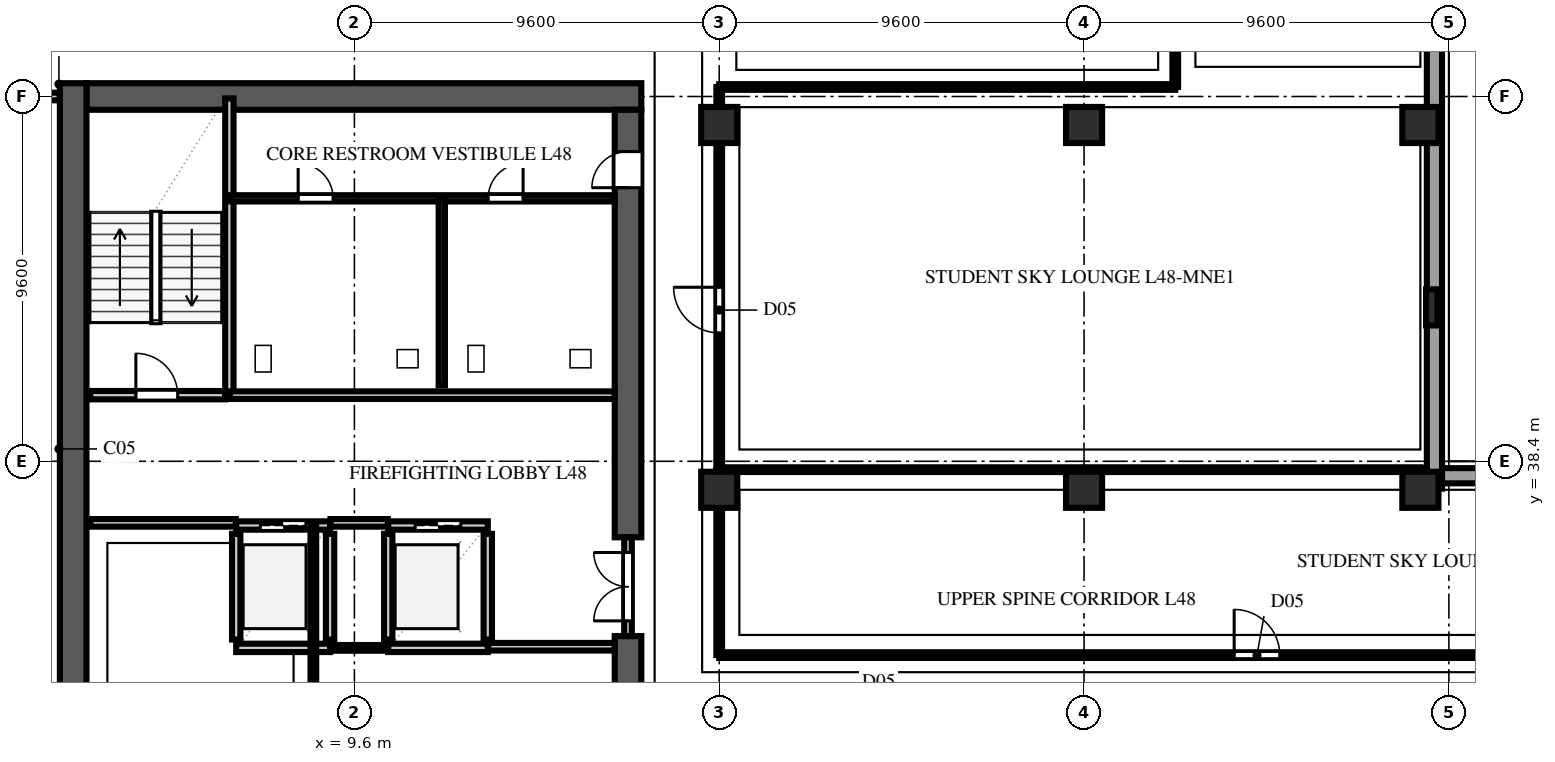
"""IFC4 building model, lengths in metres.
Left out: names, types, materials, properties, quantities, classifications, styles, units other than length and angle.
Written with IfcOpenShell. Run it as: python <this file> out.ifc"""

import sys

from ifc_helpers import new_model, si_unit, direction, frame, frame_2d, origin, origin_2d, place, context, subcontext, project, spatial, rectangle, extrude, element, fill, save


model = new_model("IFC4")
c1 = context("Model", 3, precision=1e-05, world=origin(), true_north=direction((0.0, 1.0)))
c2 = subcontext(c1, "Body", "Model", "MODEL_VIEW")
j1 = project(units=[si_unit("LENGTHUNIT", "METRE"), si_unit("PLANEANGLEUNIT", "RADIAN")], contexts=[c1])
p1 = place(None, origin())
s1 = spatial("IfcSite", under=j1, at=p1, CompositionType="ELEMENT")
p2 = place(p1, origin())
s2 = spatial("IfcBuilding", under=s1, at=p2, CompositionType="ELEMENT")
p3 = place(p2, frame((0.0, 0.0, 190.2)))
s3 = spatial("IfcBuildingStorey", under=s2, at=p3, CompositionType="ELEMENT", Elevation=190.2)
p4 = place(p3, frame((2.55, 48.0, 0.0), z_axis=(0.0, 0.0, 1.0), x_axis=(1.0, 0.0, 0.0)))
e1 = element("IfcWall", 1, at=p4, inside=s3, PredefinedType="SHEAR", context=c2, shape_type="SweptSolid", body=[
    extrude(rectangle(XDim=14.6, YDim=0.7, at=frame_2d((7.3, 0.0))), origin(), (0.0, 0.0, 1.0), 3.48),
])
p5 = place(p3, frame((2.2, 9.25, 0.0), z_axis=(0.0, 0.0, 1.0), x_axis=(0.0, 1.0, 0.0)))
e2 = element("IfcWall", 2, at=p5, inside=s3, PredefinedType="SHEAR", context=c2, shape_type="SweptSolid", body=[
    extrude(rectangle(XDim=39.1, YDim=0.7, at=frame_2d((19.55, 0.0))), origin(), (0.0, 0.0, 1.0), 3.48),
])
p6 = place(p3, frame((16.8, 26.0, 0.0), z_axis=(0.0, 0.0, 1.0), x_axis=(0.0, 1.0, 0.0)))
e3 = element("IfcWall", 3, at=p6, inside=s3, PredefinedType="SHEAR", context=c2, shape_type="SweptSolid", body=[
    extrude(rectangle(XDim=7.8, YDim=0.7, at=frame_2d((3.9, 0.0))), origin(), (0.0, 0.0, 1.0), 3.48),
])
p7 = place(p3, frame((16.8, 36.4, 0.0), z_axis=(0.0, 0.0, 1.0), x_axis=(0.0, 1.0, 0.0)))
e4 = element("IfcWall", 4, at=p7, inside=s3, PredefinedType="SHEAR", context=c2, shape_type="SweptSolid", body=[
    extrude(rectangle(XDim=11.25, YDim=0.7, at=frame_2d((5.625, 0.0))), origin(), (0.0, 0.0, 1.0), 3.48),
])
p8 = place(p7, frame((9.2, 0.0, 0.0)))
e5 = element("IfcOpeningElement", 5, at=p8, cuts=e4, PredefinedType="OPENING", context=c2, shape_type="SweptSolid", body=[
    extrude(rectangle(XDim=0.95, YDim=2.15, at=frame_2d((0.475, 1.075))), frame((0.0, 0.362, 0.0), z_axis=(0.0, -1.0, 0.0), x_axis=(1.0, 0.0, 0.0)), (0.0, 0.0, 1.0), 0.724),
])
for number, where, z_axis, x_axis in (
    (6, (19.2, 37.65, 0.0), (0.0, 0.0, 1.0), (1.0, 0.0, 0.0)),
    (7, (19.2, 47.25, 0.0), (0.0, 0.0, 1.0), (1.0, 0.0, 0.0)),
    (8, (28.8, 37.65, 0.0), (0.0, 0.0, 1.0), (1.0, 0.0, 0.0)),
    (9, (28.8, 47.25, 0.0), (0.0, 0.0, 1.0), (1.0, 0.0, 0.0)),
    (10, (37.65, 37.65, 0.0), (0.0, 0.0, 1.0), (1.0, 0.0, 0.0)),
    (11, (37.65, 47.25, 0.0), (0.0, 0.0, 1.0), (1.0, 0.0, 0.0)),
):
    element("IfcColumn", number, at=place(p3, frame(where, z_axis=z_axis, x_axis=x_axis)), inside=s3, PredefinedType="COLUMN", context=c2, shape_type="SweptSolid", body=[
        extrude(rectangle(XDim=0.95, YDim=0.95, at=origin_2d()), origin(), (0.0, 0.0, 1.0), 3.8),
    ])
p9 = place(p3, frame((37.95, 42.45, 0.0), z_axis=(0.0, 0.0, 1.0), x_axis=(0.0, 1.0, 0.0)))
e12 = element("IfcColumn", 12, at=p9, inside=s3, PredefinedType="PILASTER", context=c2, shape_type="SweptSolid", body=[
    extrude(rectangle(XDim=0.95, YDim=0.3, at=origin_2d()), origin(), (0.0, 0.0, 1.0), 3.8),
])
p10 = place(p3, frame((55.76, 38.02, 0.0), z_axis=(0.0, 0.0, 1.0), x_axis=(-1.0, 0.0, 0.0)))
e13 = element("IfcWall", 13, at=p10, inside=s3, PredefinedType="SOLIDWALL", context=c2, shape_type="SweptSolid", body=[
    extrude(rectangle(XDim=18.08, YDim=0.4, at=frame_2d((9.04, 0.0))), origin(), (0.0, 0.0, 1.0), 3.48),
])
p11 = place(p3, frame((38.02, 37.68, 0.0), z_axis=(0.0, 0.0, 1.0), x_axis=(0.0, 1.0, 0.0)))
e14 = element("IfcWall", 14, at=p11, inside=s3, PredefinedType="SOLIDWALL", context=c2, shape_type="SweptSolid", body=[
    extrude(rectangle(XDim=27.68, YDim=0.4, at=frame_2d((13.84, 0.0))), origin(), (0.0, 0.0, 1.0), 3.48),
])
p12 = place(p3, frame((2.65, 40.14, 0.0), z_axis=(0.0, 0.0, 1.0), x_axis=(1.0, 0.0, 0.0)))
e15 = element("IfcWall", 15, at=p12, inside=s3, PredefinedType="SOLIDWALL", context=c2, shape_type="SweptSolid", body=[
    extrude(rectangle(XDim=3.55, YDim=0.22, at=frame_2d((1.775, 0.0))), origin(), (0.0, 0.0, 1.0), 3.48),
])
p13 = place(p12, frame((1.2, 0.0, 0.0)))
e16 = element("IfcOpeningElement", 16, at=p13, cuts=e15, PredefinedType="OPENING", context=c2, shape_type="SweptSolid", body=[
    extrude(rectangle(XDim=1.1, YDim=2.2, at=frame_2d((0.55, 1.1))), frame((0.0, 0.122, 0.0), z_axis=(0.0, -1.0, 0.0), x_axis=(1.0, 0.0, 0.0)), (0.0, 0.0, 1.0), 0.244),
])
p14 = place(p3, frame((6.31, 40.14, 0.0), z_axis=(0.0, 0.0, 1.0), x_axis=(0.0, 1.0, 0.0)))
e17 = element("IfcWall", 17, at=p14, inside=s3, PredefinedType="SOLIDWALL", context=c2, shape_type="SweptSolid", body=[
    extrude(rectangle(XDim=7.81, YDim=0.22, at=frame_2d((3.905, 0.0))), origin(), (0.0, 0.0, 1.0), 3.48),
])
for number, where, z_axis, x_axis in (
    (18, (6.49, 33.71, 0.0), (0.0, 0.0, 1.0), (0.0, 1.0, 0.0)),
    (19, (8.96, 33.71, 0.0), (0.0, 0.0, 1.0), (0.0, 1.0, 0.0)),
):
    element("IfcWall", number, at=place(p3, frame(where, z_axis=z_axis, x_axis=x_axis)), inside=s3, PredefinedType="SOLIDWALL", context=c2, shape_type="SweptSolid", body=[
        extrude(rectangle(XDim=2.78, YDim=0.22, at=frame_2d((1.39, 0.0))), origin(), (0.0, 0.0, 1.0), 3.48),
    ])
p15 = place(p3, frame((6.49, 33.49, 0.0), z_axis=(0.0, 0.0, 1.0), x_axis=(1.0, 0.0, 0.0)))
e20 = element("IfcWall", 20, at=p15, inside=s3, PredefinedType="SOLIDWALL", context=c2, shape_type="SweptSolid", body=[
    extrude(rectangle(XDim=2.47, YDim=0.22, at=frame_2d((1.235, 0.0))), origin(), (0.0, 0.0, 1.0), 3.48),
])
p16 = place(p3, frame((6.49, 36.71, 0.0), z_axis=(0.0, 0.0, 1.0), x_axis=(1.0, 0.0, 0.0)))
e21 = element("IfcWall", 21, at=p16, inside=s3, PredefinedType="SOLIDWALL", context=c2, shape_type="SweptSolid", body=[
    extrude(rectangle(XDim=2.47, YDim=0.22, at=frame_2d((1.235, 0.0))), origin(), (0.0, 0.0, 1.0), 3.48),
])
p17 = place(p16, frame((0.635, 0.0, 0.0)))
e22 = element("IfcOpeningElement", 22, at=p17, cuts=e21, PredefinedType="OPENING", context=c2, shape_type="SweptSolid", body=[
    extrude(rectangle(XDim=1.2, YDim=2.2, at=frame_2d((0.6, 1.1))), frame((0.0, 0.122, 0.0), z_axis=(0.0, -1.0, 0.0), x_axis=(1.0, 0.0, 0.0)), (0.0, 0.0, 1.0), 0.244),
])
for number, where, z_axis, x_axis in (
    (23, (10.49, 33.71, 0.0), (0.0, 0.0, 1.0), (0.0, 1.0, 0.0)),
    (24, (13.11, 33.71, 0.0), (0.0, 0.0, 1.0), (0.0, 1.0, 0.0)),
):
    element("IfcWall", number, at=place(p3, frame(where, z_axis=z_axis, x_axis=x_axis)), inside=s3, PredefinedType="SOLIDWALL", context=c2, shape_type="SweptSolid", body=[
        extrude(rectangle(XDim=2.78, YDim=0.22, at=frame_2d((1.39, 0.0))), origin(), (0.0, 0.0, 1.0), 3.48),
    ])
p18 = place(p3, frame((10.49, 33.49, 0.0), z_axis=(0.0, 0.0, 1.0), x_axis=(1.0, 0.0, 0.0)))
e25 = element("IfcWall", 25, at=p18, inside=s3, PredefinedType="SOLIDWALL", context=c2, shape_type="SweptSolid", body=[
    extrude(rectangle(XDim=2.62, YDim=0.22, at=frame_2d((1.31, 0.0))), origin(), (0.0, 0.0, 1.0), 3.48),
])
p19 = place(p3, frame((10.49, 36.71, 0.0), z_axis=(0.0, 0.0, 1.0), x_axis=(1.0, 0.0, 0.0)))
e26 = element("IfcWall", 26, at=p19, inside=s3, PredefinedType="SOLIDWALL", context=c2, shape_type="SweptSolid", body=[
    extrude(rectangle(XDim=2.62, YDim=0.22, at=frame_2d((1.31, 0.0))), origin(), (0.0, 0.0, 1.0), 3.48),
])
p20 = place(p19, frame((0.71, 0.0, 0.0)))
e27 = element("IfcOpeningElement", 27, at=p20, cuts=e26, PredefinedType="OPENING", context=c2, shape_type="SweptSolid", body=[
    extrude(rectangle(XDim=1.2, YDim=2.2, at=frame_2d((0.6, 1.1))), frame((0.0, 0.122, 0.0), z_axis=(0.0, -1.0, 0.0), x_axis=(1.0, 0.0, 0.0)), (0.0, 0.0, 1.0), 0.244),
])
p21 = place(p3, frame((2.65, 36.78, 0.0), z_axis=(0.0, 0.0, 1.0), x_axis=(1.0, 0.0, 0.0)))
e28 = element("IfcWall", 28, at=p21, inside=s3, PredefinedType="SOLIDWALL", context=c2, shape_type="SweptSolid", body=[
    extrude(rectangle(XDim=3.83, YDim=0.2, at=frame_2d((1.915, 0.0))), origin(), (0.0, 0.0, 1.0), 3.48),
])
p22 = place(p3, frame((8.97, 36.78, 0.0), z_axis=(0.0, 0.0, 1.0), x_axis=(1.0, 0.0, 0.0)))
e29 = element("IfcWall", 29, at=p22, inside=s3, PredefinedType="SOLIDWALL", context=c2, shape_type="SweptSolid", body=[
    extrude(rectangle(XDim=1.51, YDim=0.2, at=frame_2d((0.755, 0.0))), origin(), (0.0, 0.0, 1.0), 3.48),
])
p23 = place(p3, frame((13.12, 33.52, 0.0), z_axis=(0.0, 0.0, 1.0), x_axis=(1.0, 0.0, 0.0)))
e30 = element("IfcWall", 30, at=p23, inside=s3, PredefinedType="SOLIDWALL", context=c2, shape_type="SweptSolid", body=[
    extrude(rectangle(XDim=3.33, YDim=0.2, at=frame_2d((1.665, 0.0))), origin(), (0.0, 0.0, 1.0), 3.48),
])
p24 = place(p3, frame((6.32, 40.14, 0.0), z_axis=(0.0, 0.0, 1.0), x_axis=(1.0, 0.0, 0.0)))
e31 = element("IfcWall", 31, at=p24, inside=s3, PredefinedType="SOLIDWALL", context=c2, shape_type="SweptSolid", body=[
    extrude(rectangle(XDim=10.13, YDim=0.2, at=frame_2d((5.065, 0.0))), origin(), (0.0, 0.0, 1.0), 3.48),
])
p25 = place(p3, frame((16.8, 33.8, 0.0), z_axis=(0.0, 0.0, 1.0), x_axis=(0.0, 1.0, 0.0)))
e32 = element("IfcWall", 32, at=p25, inside=s3, PredefinedType="SOLIDWALL", context=c2, shape_type="SweptSolid", body=[
    extrude(rectangle(XDim=2.6, YDim=0.2, at=frame_2d((1.3, 0.0))), origin(), (0.0, 0.0, 1.0), 3.48),
])
p26 = place(p25, frame((0.4, 0.0, 0.0)))
e33 = element("IfcOpeningElement", 33, at=p26, cuts=e32, PredefinedType="OPENING", context=c2, shape_type="SweptSolid", body=[
    extrude(rectangle(XDim=1.8, YDim=2.2, at=frame_2d((0.9, 1.1))), frame((0.0, 0.112, 0.0), z_axis=(0.0, -1.0, 0.0), x_axis=(1.0, 0.0, 0.0)), (0.0, 0.0, 1.0), 0.224),
])
p27 = place(p3, frame((8.965, 33.49, 0.0), z_axis=(0.0, 0.0, 1.0), x_axis=(1.0, 0.0, 0.0)))
e34 = element("IfcWall", 34, at=p27, inside=s3, PredefinedType="PARTITIONING", context=c2, shape_type="SweptSolid", body=[
    extrude(rectangle(XDim=1.52, YDim=0.15, at=frame_2d((0.76, 0.0))), origin(), (0.0, 0.0, 1.0), 3.48),
])
p28 = place(p3, frame((8.52, 12.02, 0.0), z_axis=(0.0, 0.0, 1.0), x_axis=(0.0, 1.0, 0.0)))
e35 = element("IfcWall", 35, at=p28, inside=s3, PredefinedType="PARTITIONING", context=c2, shape_type="SweptSolid", body=[
    extrude(rectangle(XDim=24.76, YDim=0.15, at=frame_2d((12.38, 0.0))), origin(), (0.0, 0.0, 1.0), 3.48),
])
p29 = place(p28, frame((2.0, 0.0, 0.0)))
e36 = element("IfcOpeningElement", 36, at=p29, cuts=e35, PredefinedType="OPENING", context=c2, shape_type="SweptSolid", body=[
    extrude(rectangle(XDim=0.85, YDim=2.1, at=frame_2d((0.425, 1.05))), frame((0.0, 0.087, 0.0), z_axis=(0.0, -1.0, 0.0), x_axis=(1.0, 0.0, 0.0)), (0.0, 0.0, 1.0), 0.174),
])
p30 = place(p28, frame((12.0, 0.0, 0.0)))
e37 = element("IfcOpeningElement", 37, at=p30, cuts=e35, PredefinedType="OPENING", context=c2, shape_type="SweptSolid", body=[
    extrude(rectangle(XDim=1.0, YDim=2.2, at=frame_2d((0.5, 1.1))), frame((0.0, 0.087, 0.0), z_axis=(0.0, -1.0, 0.0), x_axis=(1.0, 0.0, 0.0)), (0.0, 0.0, 1.0), 0.174),
])
p31 = place(p3, frame((6.32, 45.32, 0.0), z_axis=(0.0, 0.0, 1.0), x_axis=(1.0, 0.0, 0.0)))
e38 = element("IfcWall", 38, at=p31, inside=s3, PredefinedType="PLUMBINGWALL", context=c2, shape_type="SweptSolid", body=[
    extrude(rectangle(XDim=10.13, YDim=0.165, at=frame_2d((5.065, 0.0))), origin(), (0.0, 0.0, 1.0), 3.48),
])
p32 = place(p31, frame((1.8, 0.0, 0.0)))
e39 = element("IfcOpeningElement", 39, at=p32, cuts=e38, PredefinedType="OPENING", context=c2, shape_type="SweptSolid", body=[
    extrude(rectangle(XDim=0.92, YDim=2.15, at=frame_2d((0.46, 1.075))), frame((0.0, 0.094, 0.0), z_axis=(0.0, -1.0, 0.0), x_axis=(1.0, 0.0, 0.0)), (0.0, 0.0, 1.0), 0.189),
])
p33 = place(p31, frame((6.8, 0.0, 0.0)))
e40 = element("IfcOpeningElement", 40, at=p33, cuts=e38, PredefinedType="OPENING", context=c2, shape_type="SweptSolid", body=[
    extrude(rectangle(XDim=0.92, YDim=2.15, at=frame_2d((0.46, 1.075))), frame((0.0, 0.094, 0.0), z_axis=(0.0, -1.0, 0.0), x_axis=(1.0, 0.0, 0.0)), (0.0, 0.0, 1.0), 0.189),
])
p34 = place(p3, frame((11.9, 40.4, 0.0), z_axis=(0.0, 0.0, 1.0), x_axis=(0.0, 1.0, 0.0)))
e41 = element("IfcWall", 41, at=p34, inside=s3, PredefinedType="PLUMBINGWALL", context=c2, shape_type="SweptSolid", body=[
    extrude(rectangle(XDim=4.92, YDim=0.165, at=frame_2d((2.46, 0.0))), origin(), (0.0, 0.0, 1.0), 3.48),
])
p35 = place(p3, frame((0.85, 48.0, 0.0), z_axis=(0.0, 0.0, 1.0), x_axis=(1.0, 0.0, 0.0)))
e42 = element("IfcWall", 42, at=p35, inside=s3, PredefinedType="SOLIDWALL", context=c2, shape_type="SweptSolid", body=[
    extrude(rectangle(XDim=0.995, YDim=0.2, at=frame_2d((0.498, 0.0))), origin(), (0.0, 0.0, 1.0), 3.48),
])
p36 = place(p3, frame((19.2, 33.3, 0.0), z_axis=(0.0, 0.0, 1.0), x_axis=(1.0, 0.0, 0.0)))
e43 = element("IfcWall", 43, at=p36, inside=s3, PredefinedType="PARTITIONING", context=c2, shape_type="SweptSolid", body=[
    extrude(rectangle(XDim=27.935, YDim=0.15, at=frame_2d((13.968, 0.0))), origin(), (0.0, 0.0, 1.0), 3.023),
])
p37 = place(p36, frame((13.55, 0.0, 0.0)))
e44 = element("IfcOpeningElement", 44, at=p37, cuts=e43, PredefinedType="OPENING", context=c2, shape_type="SweptSolid", body=[
    extrude(rectangle(XDim=1.2, YDim=2.2, at=frame_2d((0.6, 1.1))), frame((0.0, 0.087, 0.0), z_axis=(0.0, -1.0, 0.0), x_axis=(1.0, 0.0, 0.0)), (0.0, 0.0, 1.0), 0.174),
])
p38 = place(p3, frame((19.2, 33.3, 0.0), z_axis=(0.0, 0.0, 1.0), x_axis=(0.0, 1.0, 0.0)))
e45 = element("IfcWall", 45, at=p38, inside=s3, PredefinedType="PARTITIONING", context=c2, shape_type="SweptSolid", body=[
    extrude(rectangle(XDim=4.88, YDim=0.15, at=frame_2d((2.44, 0.0))), origin(), (0.0, 0.0, 1.0), 2.863),
])
p39 = place(p3, frame((19.28, 38.18, 0.0), z_axis=(0.0, 0.0, 1.0), x_axis=(1.0, 0.0, 0.0)))
e46 = element("IfcWall", 46, at=p39, inside=s3, PredefinedType="PARTITIONING", context=c2, shape_type="SweptSolid", body=[
    extrude(rectangle(XDim=18.37, YDim=0.125, at=frame_2d((9.185, 0.0))), origin(), (0.0, 0.0, 1.0), 3.48),
])
p40 = place(p3, frame((19.2, 38.18, 0.0), z_axis=(0.0, 0.0, 1.0), x_axis=(0.0, 1.0, 0.0)))
e47 = element("IfcWall", 47, at=p40, inside=s3, PredefinedType="PARTITIONING", context=c2, shape_type="SweptSolid", body=[
    extrude(rectangle(XDim=10.07, YDim=0.15, at=frame_2d((5.035, 0.0))), origin(), (0.0, 0.0, 1.0), 2.863),
])
p41 = place(p40, frame((3.6, 0.0, 0.0)))
e48 = element("IfcOpeningElement", 48, at=p41, cuts=e47, PredefinedType="OPENING", context=c2, shape_type="SweptSolid", body=[
    extrude(rectangle(XDim=1.2, YDim=2.2, at=frame_2d((0.6, 1.1))), frame((0.0, 0.087, 0.0), z_axis=(0.0, -1.0, 0.0), x_axis=(1.0, 0.0, 0.0)), (0.0, 0.0, 1.0), 0.174),
])
p42 = place(p3, frame((19.2, 48.25, 0.0), z_axis=(0.0, 0.0, 1.0), x_axis=(1.0, 0.0, 0.0)))
e49 = element("IfcWall", 49, at=p42, inside=s3, PredefinedType="PARTITIONING", context=c2, shape_type="SweptSolid", body=[
    extrude(rectangle(XDim=12.0, YDim=0.15, at=frame_2d((6.0, 0.0))), origin(), (0.0, 0.0, 1.0), 3.48),
])
p43 = place(p3, frame((31.2, 48.25, 0.0), z_axis=(0.0, 0.0, 1.0), x_axis=(0.0, 1.0, 0.0)))
e50 = element("IfcWall", 50, at=p43, inside=s3, PredefinedType="PARTITIONING", context=c2, shape_type="SweptSolid", body=[
    extrude(rectangle(XDim=18.73, YDim=0.15, at=frame_2d((9.365, 0.0))), origin(), (0.0, 0.0, 1.0), 3.48),
])
p44 = place(p43, frame((3.15, 0.0, 0.0)))
e51 = element("IfcOpeningElement", 51, at=p44, cuts=e50, PredefinedType="OPENING", context=c2, shape_type="SweptSolid", body=[
    extrude(rectangle(XDim=1.2, YDim=2.2, at=frame_2d((0.6, 1.1))), frame((0.0, 0.087, 0.0), z_axis=(0.0, -1.0, 0.0), x_axis=(1.0, 0.0, 0.0)), (0.0, 0.0, 1.0), 0.174),
])
p45 = place(p13, origin())
e52 = element("IfcDoor", 52, at=p45, inside=s3, OperationType="SINGLE_SWING_LEFT", PredefinedType="DOOR", context=c2, shape_type="SweptSolid", body=[
    extrude(rectangle(XDim=1.1, YDim=2.2, at=frame_2d((0.55, 1.1))), frame((0.0, 0.025, 0.0), z_axis=(0.0, -1.0, 0.0), x_axis=(1.0, 0.0, 0.0)), (0.0, 0.0, 1.0), 0.05),
])
fill(e16, e52)
p46 = place(p17, origin())
e53 = element("IfcDoor", 53, at=p46, inside=s3, OperationType="DOUBLE_DOOR_SLIDING", PredefinedType="DOOR", context=c2, shape_type="SweptSolid", body=[
    extrude(rectangle(XDim=1.2, YDim=2.2, at=frame_2d((0.6, 1.1))), frame((0.0, 0.025, 0.0), z_axis=(0.0, -1.0, 0.0), x_axis=(1.0, 0.0, 0.0)), (0.0, 0.0, 1.0), 0.05),
])
fill(e22, e53)
p47 = place(p20, origin())
e54 = element("IfcDoor", 54, at=p47, inside=s3, OperationType="DOUBLE_DOOR_SLIDING", PredefinedType="DOOR", context=c2, shape_type="SweptSolid", body=[
    extrude(rectangle(XDim=1.2, YDim=2.2, at=frame_2d((0.6, 1.1))), frame((0.0, 0.025, 0.0), z_axis=(0.0, -1.0, 0.0), x_axis=(1.0, 0.0, 0.0)), (0.0, 0.0, 1.0), 0.05),
])
fill(e27, e54)
p48 = place(p8, origin())
e55 = element("IfcDoor", 55, at=p48, inside=s3, OperationType="SINGLE_SWING_LEFT", PredefinedType="DOOR", context=c2, shape_type="SweptSolid", body=[
    extrude(rectangle(XDim=0.95, YDim=2.15, at=frame_2d((0.475, 1.075))), frame((0.0, 0.025, 0.0), z_axis=(0.0, -1.0, 0.0), x_axis=(1.0, 0.0, 0.0)), (0.0, 0.0, 1.0), 0.05),
])
fill(e5, e55)
p49 = place(p26, origin())
e56 = element("IfcDoor", 56, at=p49, inside=s3, OperationType="DOUBLE_DOOR_SINGLE_SWING", PredefinedType="DOOR", context=c2, shape_type="SweptSolid", body=[
    extrude(rectangle(XDim=1.8, YDim=2.2, at=frame_2d((0.9, 1.1))), frame((0.0, 0.025, 0.0), z_axis=(0.0, -1.0, 0.0), x_axis=(1.0, 0.0, 0.0)), (0.0, 0.0, 1.0), 0.05),
])
fill(e33, e56)
p50 = place(p32, origin())
e57 = element("IfcDoor", 57, at=p50, inside=s3, OperationType="SINGLE_SWING_LEFT", PredefinedType="DOOR", context=c2, shape_type="SweptSolid", body=[
    extrude(rectangle(XDim=0.92, YDim=2.15, at=frame_2d((0.46, 1.075))), frame((0.0, 0.025, 0.0), z_axis=(0.0, -1.0, 0.0), x_axis=(1.0, 0.0, 0.0)), (0.0, 0.0, 1.0), 0.05),
])
fill(e39, e57)
p51 = place(p33, origin())
e58 = element("IfcDoor", 58, at=p51, inside=s3, OperationType="SINGLE_SWING_RIGHT", PredefinedType="DOOR", context=c2, shape_type="SweptSolid", body=[
    extrude(rectangle(XDim=0.92, YDim=2.15, at=frame_2d((0.46, 1.075))), frame((0.0, 0.025, 0.0), z_axis=(0.0, -1.0, 0.0), x_axis=(1.0, 0.0, 0.0)), (0.0, 0.0, 1.0), 0.05),
])
fill(e40, e58)
p52 = place(p37, origin())
e59 = element("IfcDoor", 59, at=p52, inside=s3, OperationType="SINGLE_SWING_LEFT", PredefinedType="DOOR", context=c2, shape_type="SweptSolid", body=[
    extrude(rectangle(XDim=1.2, YDim=2.2, at=frame_2d((0.6, 1.1))), frame((0.0, 0.025, 0.0), z_axis=(0.0, -1.0, 0.0), x_axis=(1.0, 0.0, 0.0)), (0.0, 0.0, 1.0), 0.05),
])
fill(e44, e59)
p53 = place(p41, origin())
e60 = element("IfcDoor", 60, at=p53, inside=s3, OperationType="SINGLE_SWING_RIGHT", PredefinedType="DOOR", context=c2, shape_type="SweptSolid", body=[
    extrude(rectangle(XDim=1.2, YDim=2.2, at=frame_2d((0.6, 1.1))), frame((0.0, 0.025, 0.0), z_axis=(0.0, -1.0, 0.0), x_axis=(1.0, 0.0, 0.0)), (0.0, 0.0, 1.0), 0.05),
])
fill(e48, e60)
save(model, sys.argv[1])
